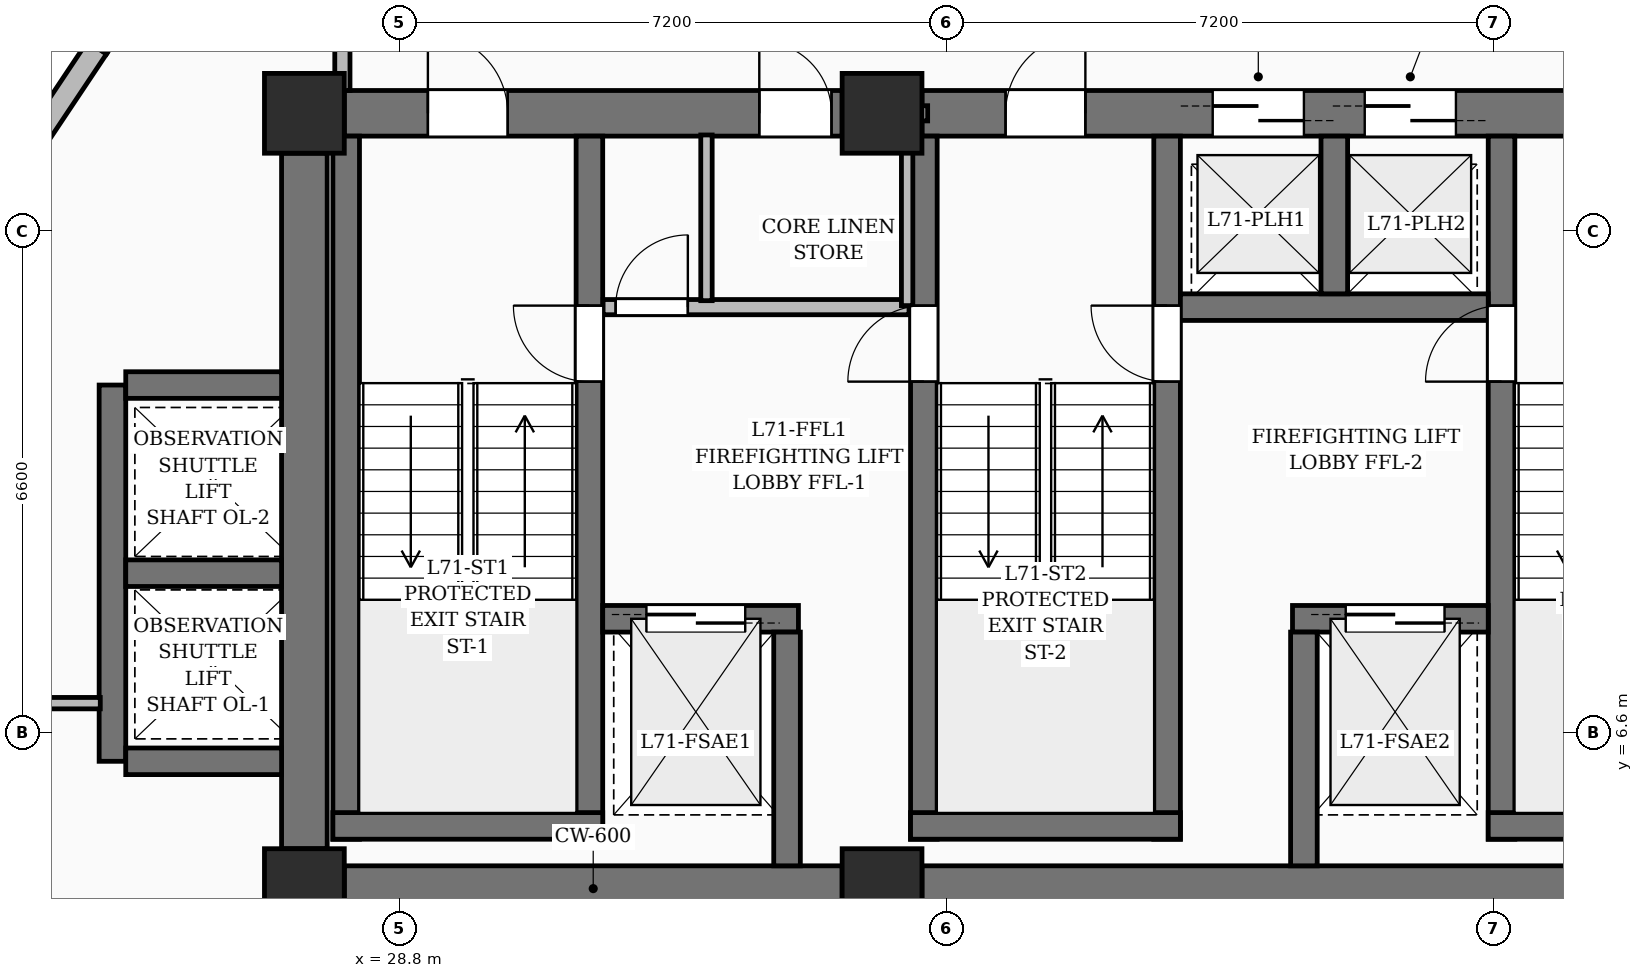
"""IFC4 building model, lengths in metres.
Left out: names, types, materials, properties, quantities, classifications, styles, units other than length and angle.
Written with IfcOpenShell. Run it as: python <this file> out.ifc"""

import sys

from ifc_helpers import new_model, si_unit, direction, frame, frame_2d, origin, origin_2d, place, context, subcontext, project, spatial, rectangle, extrude, element, fill, save


model = new_model("IFC4")
c1 = context("Model", 3, precision=1e-05, world=origin(), true_north=direction((0.0, 1.0)))
c2 = subcontext(c1, "Body", "Model", "MODEL_VIEW")
j1 = project(units=[si_unit("LENGTHUNIT", "METRE"), si_unit("PLANEANGLEUNIT", "RADIAN")], contexts=[c1])
p1 = place(None, origin())
s1 = spatial("IfcSite", under=j1, at=p1, CompositionType="ELEMENT")
p2 = place(p1, origin())
s2 = spatial("IfcBuilding", under=s1, at=p2, CompositionType="ELEMENT")
p3 = place(p2, frame((0.0, 0.0, 274.5)))
s3 = spatial("IfcBuildingStorey", under=s2, at=p3, CompositionType="ELEMENT", Elevation=274.5)
for number, where, z_axis, x_axis in (
    (1, (27.55, 4.55, 0.0), (0.0, 0.0, 1.0), (1.0, 0.0, 0.0)),
    (2, (35.15, 4.55, 0.0), (0.0, 0.0, 1.0), (1.0, 0.0, 0.0)),
    (3, (27.55, 14.75, 0.0), (0.0, 0.0, 1.0), (1.0, 0.0, 0.0)),
    (4, (35.15, 14.75, 0.0), (0.0, 0.0, 1.0), (1.0, 0.0, 0.0)),
):
    element("IfcColumn", number, at=place(p3, frame(where, z_axis=z_axis, x_axis=x_axis)), inside=s3, PredefinedType="COLUMN", context=c2, shape_type="SweptSolid", body=[
        extrude(rectangle(XDim=1.05, YDim=1.05, at=origin_2d()), origin(), (0.0, 0.0, 1.0), 3.75),
    ])
p4 = place(p3, frame((28.075, 4.55, 0.0), z_axis=(0.0, 0.0, 1.0), x_axis=(1.0, 0.0, 0.0)))
e5 = element("IfcWall", 5, at=p4, inside=s3, PredefinedType="SHEAR", context=c2, shape_type="SweptSolid", body=[
    extrude(rectangle(XDim=6.55, YDim=0.6, at=frame_2d((3.275, 0.0))), origin(), (0.0, 0.0, 1.0), 3.75),
])
p5 = place(p3, frame((35.675, 4.55, 0.0), z_axis=(0.0, 0.0, 1.0), x_axis=(1.0, 0.0, 0.0)))
e6 = element("IfcWall", 6, at=p5, inside=s3, PredefinedType="SHEAR", context=c2, shape_type="SweptSolid", body=[
    extrude(rectangle(XDim=10.85, YDim=0.6, at=frame_2d((5.425, 0.0))), origin(), (0.0, 0.0, 1.0), 3.75),
])
p6 = place(p3, frame((28.075, 14.75, 0.0), z_axis=(0.0, 0.0, 1.0), x_axis=(1.0, 0.0, 0.0)))
e7 = element("IfcWall", 7, at=p6, inside=s3, PredefinedType="SHEAR", context=c2, shape_type="SweptSolid", body=[
    extrude(rectangle(XDim=6.55, YDim=0.6, at=frame_2d((3.275, 0.0))), origin(), (0.0, 0.0, 1.0), 3.75),
])
p7 = place(p6, frame((1.1, 0.0, 0.0)))
e8 = element("IfcOpeningElement", 8, at=p7, cuts=e7, PredefinedType="OPENING", context=c2, shape_type="SweptSolid", body=[
    extrude(rectangle(XDim=1.05, YDim=2.15, at=frame_2d((0.525, 1.075))), frame((0.0, 0.31, 0.0), z_axis=(0.0, -1.0, 0.0), x_axis=(1.0, 0.0, 0.0)), (0.0, 0.0, 1.0), 0.62),
])
p8 = place(p6, frame((5.46, 0.0, 0.0)))
e9 = element("IfcOpeningElement", 9, at=p8, cuts=e7, PredefinedType="OPENING", context=c2, shape_type="SweptSolid", body=[
    extrude(rectangle(XDim=0.95, YDim=2.15, at=frame_2d((0.475, 1.075))), frame((0.0, 0.31, 0.0), z_axis=(0.0, -1.0, 0.0), x_axis=(1.0, 0.0, 0.0)), (0.0, 0.0, 1.0), 0.62),
])
p9 = place(p3, frame((35.675, 14.75, 0.0), z_axis=(0.0, 0.0, 1.0), x_axis=(1.0, 0.0, 0.0)))
e10 = element("IfcWall", 10, at=p9, inside=s3, PredefinedType="SHEAR", context=c2, shape_type="SweptSolid", body=[
    extrude(rectangle(XDim=10.85, YDim=0.6, at=frame_2d((5.425, 0.0))), origin(), (0.0, 0.0, 1.0), 3.75),
])
p10 = place(p9, frame((1.1, 0.0, 0.0)))
e11 = element("IfcOpeningElement", 11, at=p10, cuts=e10, PredefinedType="OPENING", context=c2, shape_type="SweptSolid", body=[
    extrude(rectangle(XDim=1.05, YDim=2.15, at=frame_2d((0.525, 1.075))), frame((0.0, 0.31, 0.0), z_axis=(0.0, -1.0, 0.0), x_axis=(1.0, 0.0, 0.0)), (0.0, 0.0, 1.0), 0.62),
])
p11 = place(p9, frame((8.7, 0.0, 0.0)))
e12 = element("IfcOpeningElement", 12, at=p11, cuts=e10, PredefinedType="OPENING", context=c2, shape_type="SweptSolid", body=[
    extrude(rectangle(XDim=1.05, YDim=2.15, at=frame_2d((0.525, 1.075))), frame((0.0, 0.31, 0.0), z_axis=(0.0, -1.0, 0.0), x_axis=(1.0, 0.0, 0.0)), (0.0, 0.0, 1.0), 0.62),
])
p12 = place(p9, frame((3.825, 0.0, 0.0)))
e13 = element("IfcOpeningElement", 13, at=p12, cuts=e10, PredefinedType="OPENING", context=c2, shape_type="SweptSolid", body=[
    extrude(rectangle(XDim=1.2, YDim=2.2, at=frame_2d((0.6, 1.1))), frame((0.0, 0.31, 0.0), z_axis=(0.0, -1.0, 0.0), x_axis=(1.0, 0.0, 0.0)), (0.0, 0.0, 1.0), 0.62),
])
p13 = place(p9, frame((5.825, 0.0, 0.0)))
e14 = element("IfcOpeningElement", 14, at=p13, cuts=e10, PredefinedType="OPENING", context=c2, shape_type="SweptSolid", body=[
    extrude(rectangle(XDim=1.2, YDim=2.2, at=frame_2d((0.6, 1.1))), frame((0.0, 0.31, 0.0), z_axis=(0.0, -1.0, 0.0), x_axis=(1.0, 0.0, 0.0)), (0.0, 0.0, 1.0), 0.62),
])
p14 = place(p3, frame((27.55, 5.075, 0.0), z_axis=(0.0, 0.0, 1.0), x_axis=(0.0, 1.0, 0.0)))
e15 = element("IfcWall", 15, at=p14, inside=s3, PredefinedType="SHEAR", context=c2, shape_type="SweptSolid", body=[
    extrude(rectangle(XDim=9.15, YDim=0.6, at=frame_2d((4.575, 0.0))), origin(), (0.0, 0.0, 1.0), 3.75),
])
p15 = place(p3, frame((28.1, 5.2, 0.0), z_axis=(0.0, 0.0, 1.0), x_axis=(0.0, 1.0, 0.0)))
e16 = element("IfcWall", 16, at=p15, inside=s3, PredefinedType="SOLIDWALL", context=c2, shape_type="SweptSolid", body=[
    extrude(rectangle(XDim=9.25, YDim=0.35, at=frame_2d((4.625, 0.0))), origin(), (0.0, 0.0, 1.0), 3.75),
])
p16 = place(p3, frame((31.3, 5.2, 0.0), z_axis=(0.0, 0.0, 1.0), x_axis=(0.0, 1.0, 0.0)))
e17 = element("IfcWall", 17, at=p16, inside=s3, PredefinedType="SOLIDWALL", context=c2, shape_type="SweptSolid", body=[
    extrude(rectangle(XDim=9.25, YDim=0.35, at=frame_2d((4.625, 0.0))), origin(), (0.0, 0.0, 1.0), 3.75),
])
p17 = place(p16, frame((6.02, 0.0, 0.0)))
e18 = element("IfcOpeningElement", 18, at=p17, cuts=e17, PredefinedType="OPENING", context=c2, shape_type="SweptSolid", body=[
    extrude(rectangle(XDim=1.0, YDim=2.15, at=frame_2d((0.5, 1.075))), frame((0.0, 0.185, 0.0), z_axis=(0.0, -1.0, 0.0), x_axis=(1.0, 0.0, 0.0)), (0.0, 0.0, 1.0), 0.37),
])
p18 = place(p3, frame((27.925, 5.375, 0.0), z_axis=(0.0, 0.0, 1.0), x_axis=(1.0, 0.0, 0.0)))
e19 = element("IfcWall", 19, at=p18, inside=s3, PredefinedType="SOLIDWALL", context=c2, shape_type="SweptSolid", body=[
    extrude(rectangle(XDim=3.55, YDim=0.35, at=frame_2d((1.775, 0.0))), origin(), (0.0, 0.0, 1.0), 3.75),
])
p19 = place(p3, frame((35.7, 5.2, 0.0), z_axis=(0.0, 0.0, 1.0), x_axis=(0.0, 1.0, 0.0)))
e20 = element("IfcWall", 20, at=p19, inside=s3, PredefinedType="SOLIDWALL", context=c2, shape_type="SweptSolid", body=[
    extrude(rectangle(XDim=9.25, YDim=0.35, at=frame_2d((4.625, 0.0))), origin(), (0.0, 0.0, 1.0), 3.75),
])
p20 = place(p19, frame((6.02, 0.0, 0.0)))
e21 = element("IfcOpeningElement", 21, at=p20, cuts=e20, PredefinedType="OPENING", context=c2, shape_type="SweptSolid", body=[
    extrude(rectangle(XDim=1.0, YDim=2.15, at=frame_2d((0.5, 1.075))), frame((0.0, 0.185, 0.0), z_axis=(0.0, -1.0, 0.0), x_axis=(1.0, 0.0, 0.0)), (0.0, 0.0, 1.0), 0.37),
])
p21 = place(p3, frame((38.9, 5.2, 0.0), z_axis=(0.0, 0.0, 1.0), x_axis=(0.0, 1.0, 0.0)))
e22 = element("IfcWall", 22, at=p21, inside=s3, PredefinedType="SOLIDWALL", context=c2, shape_type="SweptSolid", body=[
    extrude(rectangle(XDim=9.25, YDim=0.35, at=frame_2d((4.625, 0.0))), origin(), (0.0, 0.0, 1.0), 3.75),
])
p22 = place(p21, frame((6.02, 0.0, 0.0)))
e23 = element("IfcOpeningElement", 23, at=p22, cuts=e22, PredefinedType="OPENING", context=c2, shape_type="SweptSolid", body=[
    extrude(rectangle(XDim=1.0, YDim=2.15, at=frame_2d((0.5, 1.075))), frame((0.0, 0.185, 0.0), z_axis=(0.0, -1.0, 0.0), x_axis=(1.0, 0.0, 0.0)), (0.0, 0.0, 1.0), 0.37),
])
p23 = place(p3, frame((35.525, 5.375, 0.0), z_axis=(0.0, 0.0, 1.0), x_axis=(1.0, 0.0, 0.0)))
e24 = element("IfcWall", 24, at=p23, inside=s3, PredefinedType="SOLIDWALL", context=c2, shape_type="SweptSolid", body=[
    extrude(rectangle(XDim=3.55, YDim=0.35, at=frame_2d((1.775, 0.0))), origin(), (0.0, 0.0, 1.0), 3.75),
])
p24 = place(p3, frame((43.3, 5.2, 0.0), z_axis=(0.0, 0.0, 1.0), x_axis=(0.0, 1.0, 0.0)))
e25 = element("IfcWall", 25, at=p24, inside=s3, PredefinedType="SOLIDWALL", context=c2, shape_type="SweptSolid", body=[
    extrude(rectangle(XDim=9.25, YDim=0.35, at=frame_2d((4.625, 0.0))), origin(), (0.0, 0.0, 1.0), 3.75),
])
p25 = place(p24, frame((6.02, 0.0, 0.0)))
e26 = element("IfcOpeningElement", 26, at=p25, cuts=e25, PredefinedType="OPENING", context=c2, shape_type="SweptSolid", body=[
    extrude(rectangle(XDim=1.0, YDim=2.15, at=frame_2d((0.5, 1.075))), frame((0.0, 0.185, 0.0), z_axis=(0.0, -1.0, 0.0), x_axis=(1.0, 0.0, 0.0)), (0.0, 0.0, 1.0), 0.37),
])
p26 = place(p3, frame((43.125, 5.375, 0.0), z_axis=(0.0, 0.0, 1.0), x_axis=(1.0, 0.0, 0.0)))
e27 = element("IfcWall", 27, at=p26, inside=s3, PredefinedType="SOLIDWALL", context=c2, shape_type="SweptSolid", body=[
    extrude(rectangle(XDim=3.55, YDim=0.35, at=frame_2d((1.775, 0.0))), origin(), (0.0, 0.0, 1.0), 3.75),
])
p27 = place(p3, frame((31.475, 8.1, 0.0), z_axis=(0.0, 0.0, 1.0), x_axis=(1.0, 0.0, 0.0)))
e28 = element("IfcWall", 28, at=p27, inside=s3, PredefinedType="SOLIDWALL", context=c2, shape_type="SweptSolid", body=[
    extrude(rectangle(XDim=2.575, YDim=0.35, at=frame_2d((1.288, 0.0))), origin(), (0.0, 0.0, 1.0), 3.75),
])
p28 = place(p27, frame((0.575, 0.0, 0.0)))
e29 = element("IfcOpeningElement", 29, at=p28, cuts=e28, PredefinedType="OPENING", context=c2, shape_type="SweptSolid", body=[
    extrude(rectangle(XDim=1.3, YDim=2.25, at=frame_2d((0.65, 1.125))), frame((0.0, 0.185, 0.0), z_axis=(0.0, -1.0, 0.0), x_axis=(1.0, 0.0, 0.0)), (0.0, 0.0, 1.0), 0.37),
])
p29 = place(p3, frame((40.55, 8.1, 0.0), z_axis=(0.0, 0.0, 1.0), x_axis=(1.0, 0.0, 0.0)))
e30 = element("IfcWall", 30, at=p29, inside=s3, PredefinedType="SOLIDWALL", context=c2, shape_type="SweptSolid", body=[
    extrude(rectangle(XDim=2.575, YDim=0.35, at=frame_2d((1.288, 0.0))), origin(), (0.0, 0.0, 1.0), 3.75),
])
p30 = place(p29, frame((0.7, 0.0, 0.0)))
e31 = element("IfcOpeningElement", 31, at=p30, cuts=e30, PredefinedType="OPENING", context=c2, shape_type="SweptSolid", body=[
    extrude(rectangle(XDim=1.3, YDim=2.25, at=frame_2d((0.65, 1.125))), frame((0.0, 0.185, 0.0), z_axis=(0.0, -1.0, 0.0), x_axis=(1.0, 0.0, 0.0)), (0.0, 0.0, 1.0), 0.37),
])
for number, where, z_axis, x_axis in (
    (32, (33.9, 4.85, 0.0), (0.0, 0.0, 1.0), (0.0, 1.0, 0.0)),
    (33, (40.7, 4.85, 0.0), (0.0, 0.0, 1.0), (0.0, 1.0, 0.0)),
):
    element("IfcWall", number, at=place(p3, frame(where, z_axis=z_axis, x_axis=x_axis)), inside=s3, PredefinedType="SOLIDWALL", context=c2, shape_type="SweptSolid", body=[
        extrude(rectangle(XDim=3.075, YDim=0.35, at=frame_2d((1.538, 0.0))), origin(), (0.0, 0.0, 1.0), 3.75),
    ])
p31 = place(p3, frame((39.075, 12.2, 0.0), z_axis=(0.0, 0.0, 1.0), x_axis=(1.0, 0.0, 0.0)))
e34 = element("IfcWall", 34, at=p31, inside=s3, PredefinedType="SOLIDWALL", context=c2, shape_type="SweptSolid", body=[
    extrude(rectangle(XDim=4.05, YDim=0.35, at=frame_2d((2.025, 0.0))), origin(), (0.0, 0.0, 1.0), 3.75),
])
p32 = place(p3, frame((41.1, 12.375, 0.0), z_axis=(0.0, 0.0, 1.0), x_axis=(0.0, 1.0, 0.0)))
e35 = element("IfcWall", 35, at=p32, inside=s3, PredefinedType="SOLIDWALL", context=c2, shape_type="SweptSolid", body=[
    extrude(rectangle(XDim=2.075, YDim=0.35, at=frame_2d((1.038, 0.0))), origin(), (0.0, 0.0, 1.0), 3.75),
])
p33 = place(p3, frame((25.025, 6.225, 0.0), z_axis=(0.0, 0.0, 1.0), x_axis=(0.0, 1.0, 0.0)))
e36 = element("IfcWall", 36, at=p33, inside=s3, PredefinedType="SOLIDWALL", context=c2, shape_type="SweptSolid", body=[
    extrude(rectangle(XDim=4.95, YDim=0.35, at=frame_2d((2.475, 0.0))), origin(), (0.0, 0.0, 1.0), 3.75),
])
for number, where, z_axis, x_axis in (
    (37, (25.2, 6.225, 0.0), (0.0, 0.0, 1.0), (1.0, 0.0, 0.0)),
    (38, (25.2, 8.7, 0.0), (0.0, 0.0, 1.0), (1.0, 0.0, 0.0)),
    (39, (25.2, 11.175, 0.0), (0.0, 0.0, 1.0), (1.0, 0.0, 0.0)),
):
    element("IfcWall", number, at=place(p3, frame(where, z_axis=z_axis, x_axis=x_axis)), inside=s3, PredefinedType="SOLIDWALL", context=c2, shape_type="SweptSolid", body=[
        extrude(rectangle(XDim=2.05, YDim=0.35, at=frame_2d((1.025, 0.0))), origin(), (0.0, 0.0, 1.0), 3.75),
    ])
p34 = place(p3, frame((21.283, 10.312, 0.0), z_axis=(0.0, 0.0, 1.0), x_axis=(0.555265721759, 0.831672999586, 0.0)))
e40 = element("IfcWall", 40, at=p34, inside=s3, PredefinedType="SOLIDWALL", context=c2, shape_type="SweptSolid", body=[
    extrude(rectangle(XDim=6.375, YDim=0.3, at=frame_2d((3.187, 0.0))), origin(), (0.0, 0.0, 1.0), 3.5),
])
p35 = place(p3, frame((24.822, 15.614, 0.0), z_axis=(0.0, 0.0, 1.0), x_axis=(0.55524548365, 0.831686511185, 0.0)))
e41 = element("IfcWall", 41, at=p35, inside=s3, PredefinedType="SOLIDWALL", context=c2, shape_type="SweptSolid", body=[
    extrude(rectangle(XDim=6.095, YDim=0.3, at=frame_2d((3.047, 0.0))), origin(), (0.0, 0.0, 1.0), 3.5),
])
p36 = place(p35, frame((2.85, 0.0, 0.55)))
e42 = element("IfcOpeningElement", 42, at=p36, cuts=e41, PredefinedType="OPENING", context=c2, shape_type="SweptSolid", body=[
    extrude(rectangle(XDim=2.1, YDim=2.4, at=frame_2d((1.05, 1.2))), frame((0.0, 0.16, 0.0), z_axis=(0.0, -1.0, 0.0), x_axis=(1.0, 0.0, 0.0)), (0.0, 0.0, 1.0), 0.32),
])
p37 = place(p3, frame((34.72, 14.75, 0.0), z_axis=(0.0, 0.0, 1.0), x_axis=(1.0, 0.0, 0.0)))
e43 = element("IfcWall", 43, at=p37, inside=s3, PredefinedType="PARTITIONING", context=c2, shape_type="SweptSolid", body=[
    extrude(rectangle(XDim=1.03, YDim=0.2, at=frame_2d((0.515, 0.0))), origin(), (0.0, 0.0, 1.0), 2.685),
])
p38 = place(p3, frame((31.48, 12.2, 0.0), z_axis=(0.0, 0.0, 1.0), x_axis=(1.0, 0.0, 0.0)))
e44 = element("IfcWall", 44, at=p38, inside=s3, PredefinedType="PARTITIONING", context=c2, shape_type="SweptSolid", body=[
    extrude(rectangle(XDim=4.025, YDim=0.2, at=frame_2d((2.012, 0.0))), origin(), (0.0, 0.0, 1.0), 3.5),
])
p39 = place(p38, frame((0.165, 0.0, 0.0)))
e45 = element("IfcOpeningElement", 45, at=p39, cuts=e44, PredefinedType="OPENING", context=c2, shape_type="SweptSolid", body=[
    extrude(rectangle(XDim=0.95, YDim=2.15, at=frame_2d((0.475, 1.075))), frame((0.0, 0.11, 0.0), z_axis=(0.0, -1.0, 0.0), x_axis=(1.0, 0.0, 0.0)), (0.0, 0.0, 1.0), 0.22),
])
p40 = place(p3, frame((32.84, 12.285, 0.0), z_axis=(0.0, 0.0, 1.0), x_axis=(0.0, 1.0, 0.0)))
e46 = element("IfcWall", 46, at=p40, inside=s3, PredefinedType="PARTITIONING", context=c2, shape_type="SweptSolid", body=[
    extrude(rectangle(XDim=2.18, YDim=0.15, at=frame_2d((1.09, 0.0))), origin(), (0.0, 0.0, 1.0), 2.685),
])
p41 = place(p3, frame((35.48, 12.22, 0.0), z_axis=(0.0, 0.0, 1.0), x_axis=(0.0, 1.0, 0.0)))
e47 = element("IfcWall", 47, at=p41, inside=s3, PredefinedType="PARTITIONING", context=c2, shape_type="SweptSolid", body=[
    extrude(rectangle(XDim=2.396, YDim=0.15, at=frame_2d((1.198, 0.0))), origin(), (0.0, 0.0, 1.0), 3.5),
])
p42 = place(p3, frame((24.865, 6.99, 0.0), z_axis=(0.0, 0.0, 1.0), x_axis=(-1.0, 0.0, 0.0)))
e48 = element("IfcWall", 48, at=p42, inside=s3, PredefinedType="PARTITIONING", context=c2, shape_type="SweptSolid", body=[
    extrude(rectangle(XDim=2.2, YDim=0.15, at=frame_2d((1.1, 0.0))), origin(), (0.0, 0.0, 1.0), 2.691),
])
p43 = place(p3, frame((28.05, 17.26, 0.0), z_axis=(0.0, 0.0, 1.0), x_axis=(0.0, -1.0, 0.0)))
e49 = element("IfcWall", 49, at=p43, inside=s3, PredefinedType="PARTITIONING", context=c2, shape_type="SweptSolid", body=[
    extrude(rectangle(XDim=2.21, YDim=0.2, at=frame_2d((1.105, 0.0))), origin(), (0.0, 0.0, 1.0), 3.5),
])
p44 = place(p7, origin())
e50 = element("IfcDoor", 50, at=p44, inside=s3, OperationType="SINGLE_SWING_LEFT", PredefinedType="DOOR", context=c2, shape_type="SweptSolid", body=[
    extrude(rectangle(XDim=1.05, YDim=2.15, at=frame_2d((0.525, 1.075))), frame((0.0, 0.025, 0.0), z_axis=(0.0, -1.0, 0.0), x_axis=(1.0, 0.0, 0.0)), (0.0, 0.0, 1.0), 0.05),
])
fill(e8, e50)
p45 = place(p10, origin())
e51 = element("IfcDoor", 51, at=p45, inside=s3, OperationType="SINGLE_SWING_RIGHT", PredefinedType="DOOR", context=c2, shape_type="SweptSolid", body=[
    extrude(rectangle(XDim=1.05, YDim=2.15, at=frame_2d((0.525, 1.075))), frame((0.0, 0.025, 0.0), z_axis=(0.0, -1.0, 0.0), x_axis=(1.0, 0.0, 0.0)), (0.0, 0.0, 1.0), 0.05),
])
fill(e11, e51)
p46 = place(p17, origin())
e52 = element("IfcDoor", 52, at=p46, inside=s3, OperationType="SINGLE_SWING_RIGHT", PredefinedType="DOOR", context=c2, shape_type="SweptSolid", body=[
    extrude(rectangle(XDim=1.0, YDim=2.15, at=frame_2d((0.5, 1.075))), frame((0.0, 0.025, 0.0), z_axis=(0.0, -1.0, 0.0), x_axis=(1.0, 0.0, 0.0)), (0.0, 0.0, 1.0), 0.05),
])
fill(e18, e52)
p47 = place(p20, origin())
e53 = element("IfcDoor", 53, at=p47, inside=s3, OperationType="SINGLE_SWING_LEFT", PredefinedType="DOOR", context=c2, shape_type="SweptSolid", body=[
    extrude(rectangle(XDim=1.0, YDim=2.15, at=frame_2d((0.5, 1.075))), frame((0.0, 0.025, 0.0), z_axis=(0.0, -1.0, 0.0), x_axis=(1.0, 0.0, 0.0)), (0.0, 0.0, 1.0), 0.05),
])
fill(e21, e53)
p48 = place(p22, origin())
e54 = element("IfcDoor", 54, at=p48, inside=s3, OperationType="SINGLE_SWING_RIGHT", PredefinedType="DOOR", context=c2, shape_type="SweptSolid", body=[
    extrude(rectangle(XDim=1.0, YDim=2.15, at=frame_2d((0.5, 1.075))), frame((0.0, 0.025, 0.0), z_axis=(0.0, -1.0, 0.0), x_axis=(1.0, 0.0, 0.0)), (0.0, 0.0, 1.0), 0.05),
])
fill(e23, e54)
p49 = place(p25, origin())
e55 = element("IfcDoor", 55, at=p49, inside=s3, OperationType="SINGLE_SWING_LEFT", PredefinedType="DOOR", context=c2, shape_type="SweptSolid", body=[
    extrude(rectangle(XDim=1.0, YDim=2.15, at=frame_2d((0.5, 1.075))), frame((0.0, 0.025, 0.0), z_axis=(0.0, -1.0, 0.0), x_axis=(1.0, 0.0, 0.0)), (0.0, 0.0, 1.0), 0.05),
])
fill(e26, e55)
p50 = place(p28, origin())
e56 = element("IfcDoor", 56, at=p50, inside=s3, OperationType="DOUBLE_DOOR_SLIDING", PredefinedType="DOOR", context=c2, shape_type="SweptSolid", body=[
    extrude(rectangle(XDim=1.3, YDim=2.25, at=frame_2d((0.65, 1.125))), frame((0.0, 0.025, 0.0), z_axis=(0.0, -1.0, 0.0), x_axis=(1.0, 0.0, 0.0)), (0.0, 0.0, 1.0), 0.05),
])
fill(e29, e56)
p51 = place(p30, origin())
e57 = element("IfcDoor", 57, at=p51, inside=s3, OperationType="DOUBLE_DOOR_SLIDING", PredefinedType="DOOR", context=c2, shape_type="SweptSolid", body=[
    extrude(rectangle(XDim=1.3, YDim=2.25, at=frame_2d((0.65, 1.125))), frame((0.0, 0.025, 0.0), z_axis=(0.0, -1.0, 0.0), x_axis=(1.0, 0.0, 0.0)), (0.0, 0.0, 1.0), 0.05),
])
fill(e31, e57)
p52 = place(p12, origin())
e58 = element("IfcDoor", 58, at=p52, inside=s3, OperationType="DOUBLE_DOOR_SLIDING", PredefinedType="DOOR", context=c2, shape_type="SweptSolid", body=[
    extrude(rectangle(XDim=1.2, YDim=2.2, at=frame_2d((0.6, 1.1))), frame((0.0, 0.025, 0.0), z_axis=(0.0, -1.0, 0.0), x_axis=(1.0, 0.0, 0.0)), (0.0, 0.0, 1.0), 0.05),
])
fill(e13, e58)
p53 = place(p13, origin())
e59 = element("IfcDoor", 59, at=p53, inside=s3, OperationType="DOUBLE_DOOR_SLIDING", PredefinedType="DOOR", context=c2, shape_type="SweptSolid", body=[
    extrude(rectangle(XDim=1.2, YDim=2.2, at=frame_2d((0.6, 1.1))), frame((0.0, 0.025, 0.0), z_axis=(0.0, -1.0, 0.0), x_axis=(1.0, 0.0, 0.0)), (0.0, 0.0, 1.0), 0.05),
])
fill(e14, e59)
p54 = place(p39, origin())
e60 = element("IfcDoor", 60, at=p54, inside=s3, OperationType="SINGLE_SWING_RIGHT", PredefinedType="DOOR", context=c2, shape_type="SweptSolid", body=[
    extrude(rectangle(XDim=0.95, YDim=2.15, at=frame_2d((0.475, 1.075))), frame((0.0, 0.025, 0.0), z_axis=(0.0, -1.0, 0.0), x_axis=(1.0, 0.0, 0.0)), (0.0, 0.0, 1.0), 0.05),
])
fill(e45, e60)
p55 = place(p8, origin())
e61 = element("IfcDoor", 61, at=p55, inside=s3, OperationType="SINGLE_SWING_LEFT", PredefinedType="DOOR", context=c2, shape_type="SweptSolid", body=[
    extrude(rectangle(XDim=0.95, YDim=2.15, at=frame_2d((0.475, 1.075))), frame((0.0, 0.025, 0.0), z_axis=(0.0, -1.0, 0.0), x_axis=(1.0, 0.0, 0.0)), (0.0, 0.0, 1.0), 0.05),
])
fill(e9, e61)
save(model, sys.argv[1])
